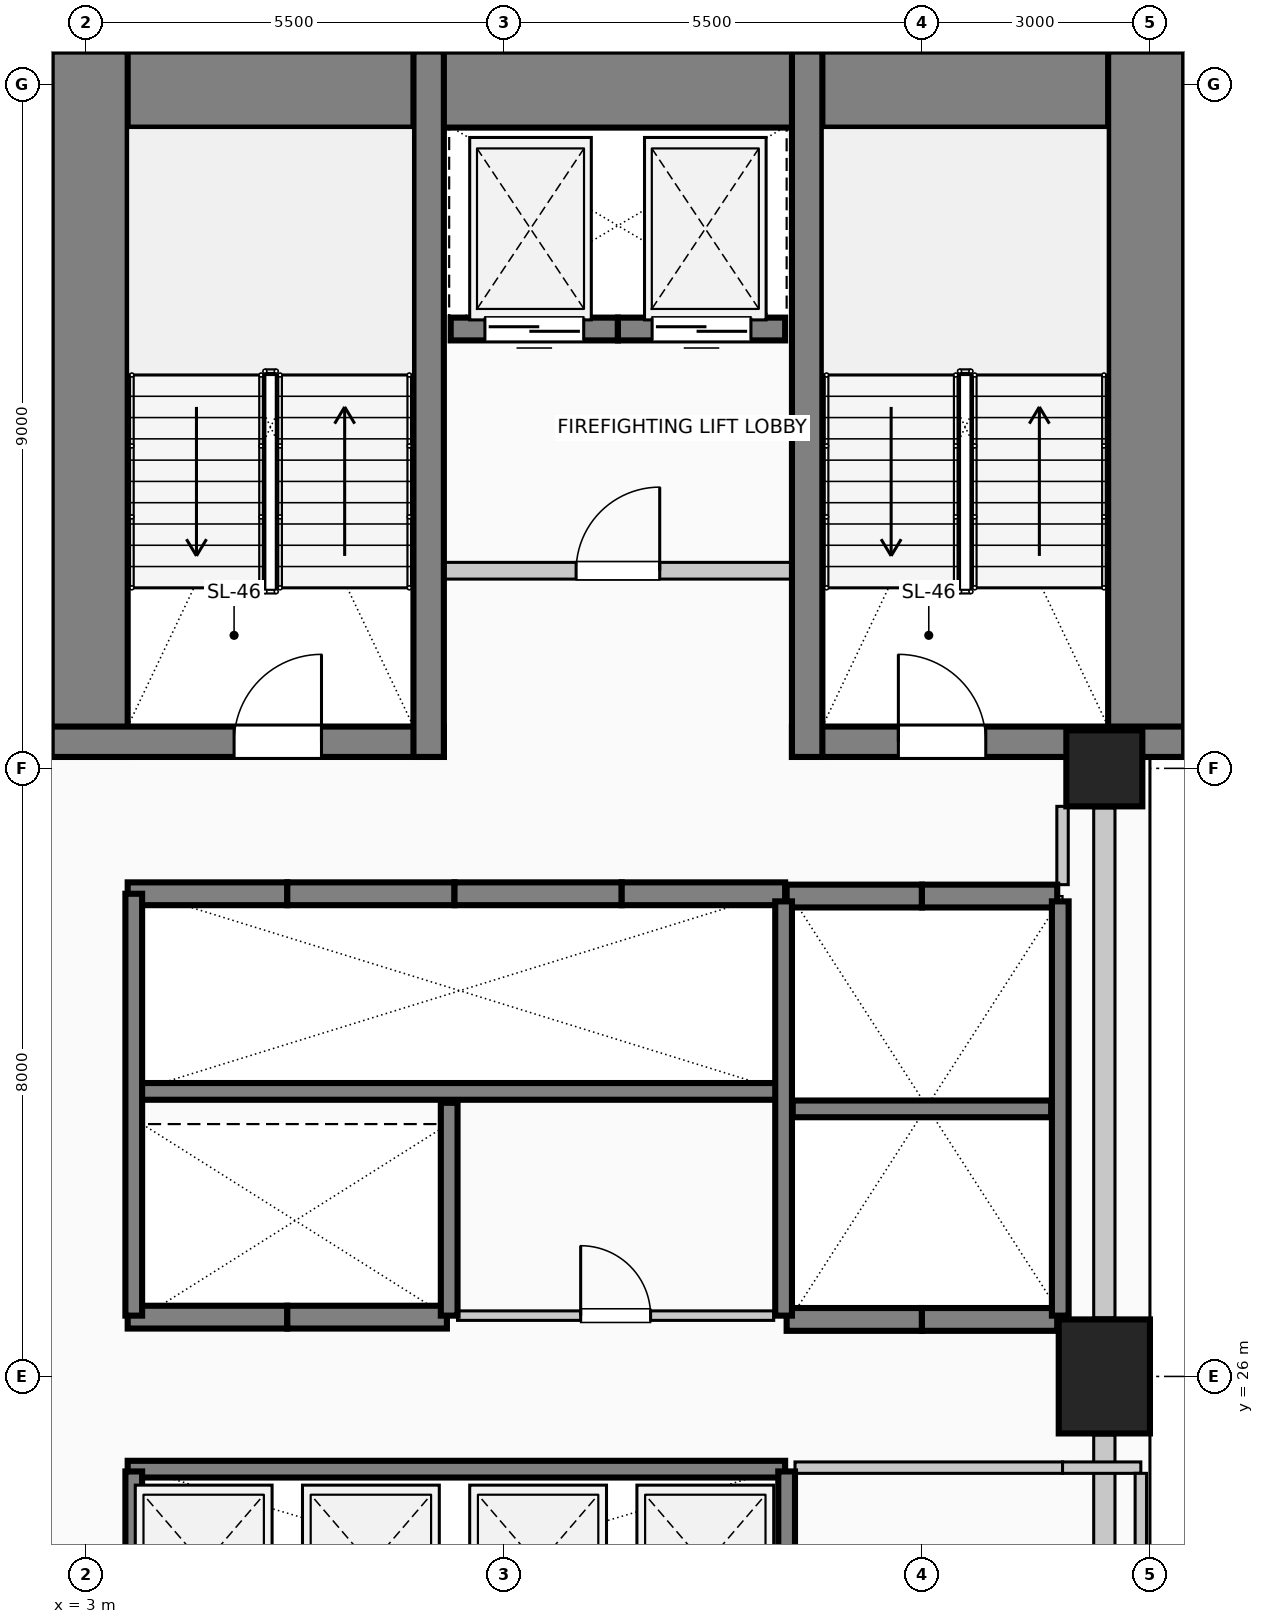
"""IFC4 building model, lengths in metres.
Left out: names, types, materials, properties, quantities, classifications, styles, units other than length and angle.
Written with IfcOpenShell. Run it as: python <this file> out.ifc"""

import sys

from ifc_helpers import new_model, si_unit, direction, frame, frame_2d, origin, origin_2d, place, context, subcontext, project, spatial, rectangle, circle, extrude, element, fill, save


model = new_model("IFC4")
c1 = context("Model", 3, precision=1e-05, world=origin(), true_north=direction((0.0, 1.0)))
c2 = subcontext(c1, "Body", "Model", "MODEL_VIEW")
j1 = project(units=[si_unit("LENGTHUNIT", "METRE"), si_unit("PLANEANGLEUNIT", "RADIAN")], contexts=[c1])
p1 = place(None, origin())
s1 = spatial("IfcSite", under=j1, at=p1, CompositionType="ELEMENT")
p2 = place(p1, origin())
s2 = spatial("IfcBuilding", under=s1, at=p2, CompositionType="ELEMENT")
p3 = place(p2, frame((0.0, 0.0, 22.6)))
s3 = spatial("IfcBuildingStorey", under=s2, at=p3, CompositionType="ELEMENT", Elevation=22.6)
p4 = place(p3, frame((2.55, 42.93, 0.0), z_axis=(0.0, 0.0, 1.0), x_axis=(1.0, 0.0, 0.0)))
e1 = element("IfcWall", 1, at=p4, inside=s3, PredefinedType="SHEAR", context=c2, shape_type="SweptSolid", body=[
    extrude(rectangle(XDim=14.9, YDim=1.0, at=frame_2d((7.45, 0.0))), origin(), (0.0, 0.0, 1.0), 4.0),
])
for number, where, z_axis, x_axis in (
    (2, (3.05, 34.15, 0.0), (0.0, 0.0, 1.0), (0.0, 1.0, 0.0)),
    (3, (16.95, 34.15, 0.0), (0.0, 0.0, 1.0), (0.0, 1.0, 0.0)),
):
    element("IfcWall", number, at=place(p3, frame(where, z_axis=z_axis, x_axis=x_axis)), inside=s3, PredefinedType="SHEAR", context=c2, shape_type="SweptSolid", body=[
        extrude(rectangle(XDim=9.28, YDim=1.0, at=frame_2d((4.64, 0.0))), origin(), (0.0, 0.0, 1.0), 4.0),
    ])
p5 = place(p3, frame((2.55, 34.35, 0.0), z_axis=(0.0, 0.0, 1.0), x_axis=(1.0, 0.0, 0.0)))
e4 = element("IfcWall", 4, at=p5, inside=s3, PredefinedType="SHEAR", context=c2, shape_type="SweptSolid", body=[
    extrude(rectangle(XDim=5.16, YDim=0.4, at=frame_2d((2.58, 0.0))), origin(), (0.0, 0.0, 1.0), 4.0),
])
p6 = place(p5, frame((2.4, 0.0, 0.0)))
e5 = element("IfcOpeningElement", 5, at=p6, cuts=e4, PredefinedType="OPENING", context=c2, shape_type="SweptSolid", body=[
    extrude(rectangle(XDim=1.15, YDim=2.2, at=frame_2d((0.575, 1.1))), frame((0.0, 0.21, 0.0), z_axis=(0.0, -1.0, 0.0), x_axis=(1.0, 0.0, 0.0)), (0.0, 0.0, 1.0), 0.42),
])
p7 = place(p3, frame((12.29, 34.35, 0.0), z_axis=(0.0, 0.0, 1.0), x_axis=(1.0, 0.0, 0.0)))
e6 = element("IfcWall", 6, at=p7, inside=s3, PredefinedType="SHEAR", context=c2, shape_type="SweptSolid", body=[
    extrude(rectangle(XDim=5.16, YDim=0.4, at=frame_2d((2.58, 0.0))), origin(), (0.0, 0.0, 1.0), 4.0),
])
p8 = place(p7, frame((1.4, 0.0, 0.0)))
e7 = element("IfcOpeningElement", 7, at=p8, cuts=e6, PredefinedType="OPENING", context=c2, shape_type="SweptSolid", body=[
    extrude(rectangle(XDim=1.15, YDim=2.2, at=frame_2d((0.575, 1.1))), frame((0.0, 0.21, 0.0), z_axis=(0.0, -1.0, 0.0), x_axis=(1.0, 0.0, 0.0)), (0.0, 0.0, 1.0), 0.42),
])
for number, where, z_axis, x_axis in (
    (8, (7.51, 34.15, 0.0), (0.0, 0.0, 1.0), (0.0, 1.0, 0.0)),
    (9, (12.49, 34.15, 0.0), (0.0, 0.0, 1.0), (0.0, 1.0, 0.0)),
):
    element("IfcWall", number, at=place(p3, frame(where, z_axis=z_axis, x_axis=x_axis)), inside=s3, PredefinedType="SHEAR", context=c2, shape_type="SweptSolid", body=[
        extrude(rectangle(XDim=9.28, YDim=0.4, at=frame_2d((4.64, 0.0))), origin(), (0.0, 0.0, 1.0), 4.0),
    ])
p9 = place(p3, frame((16.4, 26.0, 0.0), z_axis=(0.0, 0.0, 1.0), x_axis=(1.0, 0.0, 0.0)))
e10 = element("IfcColumn", 10, at=p9, inside=s3, PredefinedType="COLUMN", context=c2, shape_type="SweptSolid", body=[
    extrude(rectangle(XDim=1.2, YDim=1.5, at=origin_2d()), origin(), (0.0, 0.0, 1.0), 4.0),
])
p10 = place(p3, frame((16.4, 34.0, 0.0), z_axis=(0.0, 0.0, 1.0), x_axis=(1.0, 0.0, 0.0)))
e11 = element("IfcColumn", 11, at=p10, inside=s3, PredefinedType="COLUMN", context=c2, shape_type="SweptSolid", body=[
    extrude(circle(Radius=0.5, at=origin_2d()), origin(), (0.0, 0.0, 1.0), 4.0),
])
p11 = place(p3, frame((16.4, 25.23, 0.0), z_axis=(0.0, 0.0, 1.0), x_axis=(0.0, -1.0, 0.0)))
e12 = element("IfcWall", 12, at=p11, inside=s3, PredefinedType="SOLIDWALL", context=c2, shape_type="SweptSolid", body=[
    extrude(rectangle(XDim=6.46, YDim=0.28, at=frame_2d((3.23, 0.0))), origin(), (0.0, 0.0, 1.0), 3.0),
])
p12 = place(p3, frame((16.4, 33.48, 0.0), z_axis=(0.0, 0.0, 1.0), x_axis=(0.0, -1.0, 0.0)))
e13 = element("IfcWall", 13, at=p12, inside=s3, PredefinedType="SOLIDWALL", context=c2, shape_type="SweptSolid", body=[
    extrude(rectangle(XDim=6.71, YDim=0.28, at=frame_2d((3.355, 0.0))), origin(), (0.0, 0.0, 1.0), 3.0),
])
for number, where, z_axis, x_axis in (
    (14, (14.0, 26.75, 0.0), (0.0, 0.0, 1.0), (-1.0, 0.0, 0.0)),
    (15, (15.78, 26.75, 0.0), (0.0, 0.0, 1.0), (-1.0, 0.0, 0.0)),
    (16, (12.22, 32.32, 0.0), (0.0, 0.0, 1.0), (1.0, 0.0, 0.0)),
    (17, (14.0, 32.32, 0.0), (0.0, 0.0, 1.0), (1.0, 0.0, 0.0)),
):
    element("IfcWall", number, at=place(p3, frame(where, z_axis=z_axis, x_axis=x_axis)), inside=s3, PredefinedType="SOLIDWALL", context=c2, shape_type="SweptSolid", body=[
        extrude(rectangle(XDim=1.78, YDim=0.3, at=frame_2d((0.89, 0.0))), origin(), (0.0, 0.0, 1.0), 4.0),
    ])
p13 = place(p3, frame((3.55, 32.35, 0.0), z_axis=(0.0, 0.0, 1.0), x_axis=(1.0, 0.0, 0.0)))
e18 = element("IfcWall", 18, at=p13, inside=s3, PredefinedType="SOLIDWALL", context=c2, shape_type="SweptSolid", body=[
    extrude(rectangle(XDim=2.1, YDim=0.3, at=frame_2d((1.05, 0.0))), origin(), (0.0, 0.0, 1.0), 4.0),
])
p14 = place(p3, frame((5.65, 32.35, 0.0), z_axis=(0.0, 0.0, 1.0), x_axis=(1.0, 0.0, 0.0)))
e19 = element("IfcWall", 19, at=p14, inside=s3, PredefinedType="SOLIDWALL", context=c2, shape_type="SweptSolid", body=[
    extrude(rectangle(XDim=2.2, YDim=0.3, at=frame_2d((1.1, 0.0))), origin(), (0.0, 0.0, 1.0), 4.0),
])
p15 = place(p3, frame((7.85, 32.35, 0.0), z_axis=(0.0, 0.0, 1.0), x_axis=(1.0, 0.0, 0.0)))
e20 = element("IfcWall", 20, at=p15, inside=s3, PredefinedType="SOLIDWALL", context=c2, shape_type="SweptSolid", body=[
    extrude(rectangle(XDim=2.2, YDim=0.3, at=frame_2d((1.1, 0.0))), origin(), (0.0, 0.0, 1.0), 4.0),
])
p16 = place(p3, frame((10.05, 32.35, 0.0), z_axis=(0.0, 0.0, 1.0), x_axis=(1.0, 0.0, 0.0)))
e21 = element("IfcWall", 21, at=p16, inside=s3, PredefinedType="SOLIDWALL", context=c2, shape_type="SweptSolid", body=[
    extrude(rectangle(XDim=2.15, YDim=0.3, at=frame_2d((1.075, 0.0))), origin(), (0.0, 0.0, 1.0), 4.0),
])
p17 = place(p3, frame((5.65, 26.78, 0.0), z_axis=(0.0, 0.0, 1.0), x_axis=(-1.0, 0.0, 0.0)))
e22 = element("IfcWall", 22, at=p17, inside=s3, PredefinedType="SOLIDWALL", context=c2, shape_type="SweptSolid", body=[
    extrude(rectangle(XDim=2.1, YDim=0.3, at=frame_2d((1.05, 0.0))), origin(), (0.0, 0.0, 1.0), 4.0),
])
p18 = place(p3, frame((7.75, 26.78, 0.0), z_axis=(0.0, 0.0, 1.0), x_axis=(-1.0, 0.0, 0.0)))
e23 = element("IfcWall", 23, at=p18, inside=s3, PredefinedType="SOLIDWALL", context=c2, shape_type="SweptSolid", body=[
    extrude(rectangle(XDim=2.1, YDim=0.3, at=frame_2d((1.05, 0.0))), origin(), (0.0, 0.0, 1.0), 4.0),
])
p19 = place(p3, frame((10.0, 39.78, 0.0), z_axis=(0.0, 0.0, 1.0), x_axis=(-1.0, 0.0, 0.0)))
e24 = element("IfcWall", 24, at=p19, inside=s3, PredefinedType="SOLIDWALL", context=c2, shape_type="SweptSolid", body=[
    extrude(rectangle(XDim=2.2, YDim=0.3, at=frame_2d((1.1, 0.0))), origin(), (0.0, 0.0, 1.0), 4.0),
])
p20 = place(p19, frame((0.45, 0.0, 0.0)))
e25 = element("IfcOpeningElement", 25, at=p20, cuts=e24, PredefinedType="OPENING", context=c2, shape_type="SweptSolid", body=[
    extrude(rectangle(XDim=1.3, YDim=2.25, at=frame_2d((0.65, 1.125))), frame((0.0, 0.16, 0.0), z_axis=(0.0, -1.0, 0.0), x_axis=(1.0, 0.0, 0.0)), (0.0, 0.0, 1.0), 0.32),
])
p21 = place(p3, frame((12.2, 39.78, 0.0), z_axis=(0.0, 0.0, 1.0), x_axis=(-1.0, 0.0, 0.0)))
e26 = element("IfcWall", 26, at=p21, inside=s3, PredefinedType="SOLIDWALL", context=c2, shape_type="SweptSolid", body=[
    extrude(rectangle(XDim=2.2, YDim=0.3, at=frame_2d((1.1, 0.0))), origin(), (0.0, 0.0, 1.0), 4.0),
])
p22 = place(p21, frame((0.45, 0.0, 0.0)))
e27 = element("IfcOpeningElement", 27, at=p22, cuts=e26, PredefinedType="OPENING", context=c2, shape_type="SweptSolid", body=[
    extrude(rectangle(XDim=1.3, YDim=2.25, at=frame_2d((0.65, 1.125))), frame((0.0, 0.16, 0.0), z_axis=(0.0, -1.0, 0.0), x_axis=(1.0, 0.0, 0.0)), (0.0, 0.0, 1.0), 0.32),
])
p23 = place(p3, frame((3.55, 29.75, 0.0), z_axis=(0.0, 0.0, 1.0), x_axis=(1.0, 0.0, 0.0)))
e28 = element("IfcWall", 28, at=p23, inside=s3, PredefinedType="SOLIDWALL", context=c2, shape_type="SweptSolid", body=[
    extrude(rectangle(XDim=8.65, YDim=0.22, at=frame_2d((4.325, 0.0))), origin(), (0.0, 0.0, 1.0), 4.0),
])
p24 = place(p3, frame((3.63, 26.8, 0.0), z_axis=(0.0, 0.0, 1.0), x_axis=(0.0, 1.0, 0.0)))
e29 = element("IfcWall", 29, at=p24, inside=s3, PredefinedType="SOLIDWALL", context=c2, shape_type="SweptSolid", body=[
    extrude(rectangle(XDim=5.55, YDim=0.22, at=frame_2d((2.775, 0.0))), origin(), (0.0, 0.0, 1.0), 4.0),
])
p25 = place(p3, frame((7.78, 26.8, 0.0), z_axis=(0.0, 0.0, 1.0), x_axis=(0.0, 1.0, 0.0)))
e30 = element("IfcWall", 30, at=p25, inside=s3, PredefinedType="SOLIDWALL", context=c2, shape_type="SweptSolid", body=[
    extrude(rectangle(XDim=2.8, YDim=0.22, at=frame_2d((1.4, 0.0))), origin(), (0.0, 0.0, 1.0), 4.0),
])
for number, where, z_axis, x_axis in (
    (31, (12.18, 26.8, 0.0), (0.0, 0.0, 1.0), (0.0, 1.0, 0.0)),
    (32, (15.82, 26.8, 0.0), (0.0, 0.0, 1.0), (0.0, 1.0, 0.0)),
):
    element("IfcWall", number, at=place(p3, frame(where, z_axis=z_axis, x_axis=x_axis)), inside=s3, PredefinedType="SOLIDWALL", context=c2, shape_type="SweptSolid", body=[
        extrude(rectangle(XDim=5.45, YDim=0.22, at=frame_2d((2.725, 0.0))), origin(), (0.0, 0.0, 1.0), 4.0),
    ])
p26 = place(p3, frame((12.3, 29.52, 0.0), z_axis=(0.0, 0.0, 1.0), x_axis=(1.0, 0.0, 0.0)))
e33 = element("IfcWall", 33, at=p26, inside=s3, PredefinedType="SOLIDWALL", context=c2, shape_type="SweptSolid", body=[
    extrude(rectangle(XDim=3.4, YDim=0.22, at=frame_2d((1.7, 0.0))), origin(), (0.0, 0.0, 1.0), 4.0),
])
p27 = place(p3, frame((3.55, 24.78, 0.0), z_axis=(0.0, 0.0, 1.0), x_axis=(1.0, 0.0, 0.0)))
e34 = element("IfcWall", 34, at=p27, inside=s3, PredefinedType="SOLIDWALL", context=c2, shape_type="SweptSolid", body=[
    extrude(rectangle(XDim=8.65, YDim=0.22, at=frame_2d((4.325, 0.0))), origin(), (0.0, 0.0, 1.0), 4.0),
])
for number, where, z_axis, x_axis in (
    (35, (3.63, 22.3, 0.0), (0.0, 0.0, 1.0), (0.0, 1.0, 0.0)),
    (36, (12.22, 22.3, 0.0), (0.0, 0.0, 1.0), (0.0, 1.0, 0.0)),
):
    element("IfcWall", number, at=place(p3, frame(where, z_axis=z_axis, x_axis=x_axis)), inside=s3, PredefinedType="SOLIDWALL", context=c2, shape_type="SweptSolid", body=[
        extrude(rectangle(XDim=2.45, YDim=0.22, at=frame_2d((1.225, 0.0))), origin(), (0.0, 0.0, 1.0), 4.0),
    ])
p28 = place(p3, frame((7.51, 36.6, 0.0), z_axis=(0.0, 0.0, 1.0), x_axis=(1.0, 0.0, 0.0)))
e37 = element("IfcWall", 37, at=p28, inside=s3, PredefinedType="PARTITIONING", context=c2, shape_type="SweptSolid", body=[
    extrude(rectangle(XDim=4.98, YDim=0.22, at=frame_2d((2.49, 0.0))), origin(), (0.0, 0.0, 1.0), 3.7),
])
p29 = place(p28, frame((1.94, 0.0, 0.0)))
e38 = element("IfcOpeningElement", 38, at=p29, cuts=e37, PredefinedType="OPENING", context=c2, shape_type="SweptSolid", body=[
    extrude(rectangle(XDim=1.1, YDim=2.2, at=frame_2d((0.55, 1.1))), frame((0.0, 0.12, 0.0), z_axis=(0.0, -1.0, 0.0), x_axis=(1.0, 0.0, 0.0)), (0.0, 0.0, 1.0), 0.24),
])
p30 = place(p3, frame((12.33, 24.8, 0.0), z_axis=(0.0, 0.0, 1.0), x_axis=(1.0, 0.0, 0.0)))
e39 = element("IfcWall", 39, at=p30, inside=s3, PredefinedType="PARTITIONING", context=c2, shape_type="SweptSolid", body=[
    extrude(rectangle(XDim=3.52, YDim=0.15, at=frame_2d((1.76, 0.0))), origin(), (0.0, 0.0, 1.0), 3.7),
])
p31 = place(p3, frame((15.85, 24.8, 0.0), z_axis=(0.0, 0.0, 1.0), x_axis=(1.0, 0.0, 0.0)))
e40 = element("IfcWall", 40, at=p31, inside=s3, PredefinedType="PARTITIONING", context=c2, shape_type="SweptSolid", body=[
    extrude(rectangle(XDim=1.03, YDim=0.15, at=frame_2d((0.515, 0.0))), origin(), (0.0, 0.0, 1.0), 3.7),
])
p32 = place(p3, frame((7.89, 26.8, 0.0), z_axis=(0.0, 0.0, 1.0), x_axis=(1.0, 0.0, 0.0)))
e41 = element("IfcWall", 41, at=p32, inside=s3, PredefinedType="PARTITIONING", context=c2, shape_type="SweptSolid", body=[
    extrude(rectangle(XDim=4.16, YDim=0.125, at=frame_2d((2.08, 0.0))), origin(), (0.0, 0.0, 1.0), 3.7),
])
p33 = place(p32, frame((1.62, 0.0, 0.0)))
e42 = element("IfcOpeningElement", 42, at=p33, cuts=e41, PredefinedType="OPENING", context=c2, shape_type="SweptSolid", body=[
    extrude(rectangle(XDim=0.92, YDim=2.1, at=frame_2d((0.46, 1.05))), frame((0.0, 0.073, 0.0), z_axis=(0.0, -1.0, 0.0), x_axis=(1.0, 0.0, 0.0)), (0.0, 0.0, 1.0), 0.145),
])
p34 = place(p3, frame((15.85, 32.47, 0.0), z_axis=(0.0, 0.0, 1.0), x_axis=(0.0, 1.0, 0.0)))
e43 = element("IfcWall", 43, at=p34, inside=s3, PredefinedType="PARTITIONING", context=c2, shape_type="SweptSolid", body=[
    extrude(rectangle(XDim=1.03, YDim=0.15, at=frame_2d((0.515, 0.0))), origin(), (0.0, 0.0, 1.0), 3.7),
])
p35 = place(p3, frame((16.88, 18.75, 0.0), z_axis=(0.0, 0.0, 1.0), x_axis=(0.0, 1.0, 0.0)))
e44 = element("IfcWall", 44, at=p35, inside=s3, PredefinedType="PARTITIONING", context=c2, shape_type="SweptSolid", body=[
    extrude(rectangle(XDim=5.975, YDim=0.15, at=frame_2d((2.988, 0.0))), origin(), (0.0, 0.0, 1.0), 3.7),
])
p36 = place(p20, origin())
e45 = element("IfcDoor", 45, at=p36, inside=s3, OperationType="SLIDING_TO_LEFT", PredefinedType="DOOR", context=c2, shape_type="SweptSolid", body=[
    extrude(rectangle(XDim=1.3, YDim=2.25, at=frame_2d((0.65, 1.125))), frame((0.0, 0.025, 0.0), z_axis=(0.0, -1.0, 0.0), x_axis=(1.0, 0.0, 0.0)), (0.0, 0.0, 1.0), 0.05),
])
fill(e25, e45)
p37 = place(p22, origin())
e46 = element("IfcDoor", 46, at=p37, inside=s3, OperationType="SLIDING_TO_RIGHT", PredefinedType="DOOR", context=c2, shape_type="SweptSolid", body=[
    extrude(rectangle(XDim=1.3, YDim=2.25, at=frame_2d((0.65, 1.125))), frame((0.0, 0.025, 0.0), z_axis=(0.0, -1.0, 0.0), x_axis=(1.0, 0.0, 0.0)), (0.0, 0.0, 1.0), 0.05),
])
fill(e27, e46)
p38 = place(p6, origin())
e47 = element("IfcDoor", 47, at=p38, inside=s3, OperationType="SINGLE_SWING_RIGHT", PredefinedType="DOOR", context=c2, shape_type="SweptSolid", body=[
    extrude(rectangle(XDim=1.15, YDim=2.2, at=frame_2d((0.575, 1.1))), frame((0.0, 0.025, 0.0), z_axis=(0.0, -1.0, 0.0), x_axis=(1.0, 0.0, 0.0)), (0.0, 0.0, 1.0), 0.05),
])
fill(e5, e47)
p39 = place(p8, origin())
e48 = element("IfcDoor", 48, at=p39, inside=s3, OperationType="SINGLE_SWING_LEFT", PredefinedType="DOOR", context=c2, shape_type="SweptSolid", body=[
    extrude(rectangle(XDim=1.15, YDim=2.2, at=frame_2d((0.575, 1.1))), frame((0.0, 0.025, 0.0), z_axis=(0.0, -1.0, 0.0), x_axis=(1.0, 0.0, 0.0)), (0.0, 0.0, 1.0), 0.05),
])
fill(e7, e48)
p40 = place(p29, origin())
e49 = element("IfcDoor", 49, at=p40, inside=s3, OperationType="SINGLE_SWING_RIGHT", PredefinedType="DOOR", context=c2, shape_type="SweptSolid", body=[
    extrude(rectangle(XDim=1.1, YDim=2.2, at=frame_2d((0.55, 1.1))), frame((0.0, 0.025, 0.0), z_axis=(0.0, -1.0, 0.0), x_axis=(1.0, 0.0, 0.0)), (0.0, 0.0, 1.0), 0.05),
])
fill(e38, e49)
p41 = place(p33, origin())
e50 = element("IfcDoor", 50, at=p41, inside=s3, OperationType="SINGLE_SWING_LEFT", PredefinedType="DOOR", context=c2, shape_type="SweptSolid", body=[
    extrude(rectangle(XDim=0.92, YDim=2.1, at=frame_2d((0.46, 1.05))), frame((0.0, 0.025, 0.0), z_axis=(0.0, -1.0, 0.0), x_axis=(1.0, 0.0, 0.0)), (0.0, 0.0, 1.0), 0.05),
])
fill(e42, e50)
save(model, sys.argv[1])
